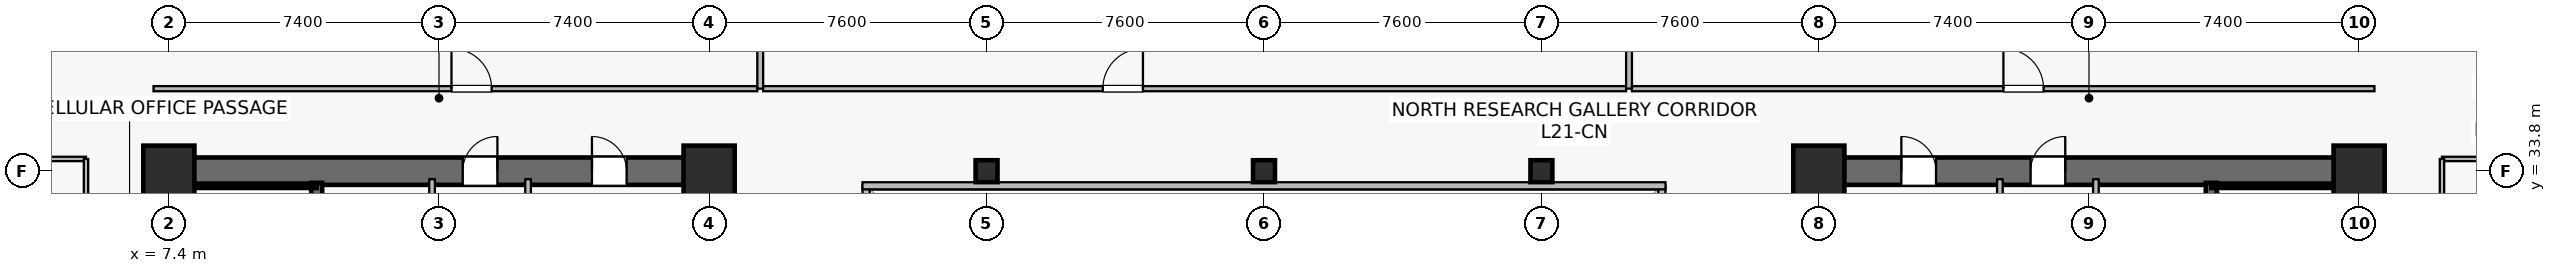
"""IFC4 building model, lengths in metres.
Left out: names, types, materials, properties, quantities, classifications, styles, units other than length and angle.
Written with IfcOpenShell. Run it as: python <this file> out.ifc"""

import sys

from ifc_helpers import new_model, si_unit, direction, frame, frame_2d, origin, origin_2d, place, context, subcontext, project, spatial, rectangle, hollow_rectangle, extrude, source, transform, mapped, element, fill, save


model = new_model("IFC4")
c1 = context("Model", 3, precision=1e-05, world=origin(), true_north=direction((0.0, 1.0)))
c2 = subcontext(c1, "Body", "Model", "MODEL_VIEW")
j1 = project(units=[si_unit("LENGTHUNIT", "METRE"), si_unit("PLANEANGLEUNIT", "RADIAN")], contexts=[c1])
p1 = place(None, origin())
s1 = spatial("IfcSite", under=j1, at=p1, CompositionType="ELEMENT")
p2 = place(p1, origin())
s2 = spatial("IfcBuilding", under=s1, at=p2, CompositionType="ELEMENT")
p3 = place(p2, frame((0.0, 0.0, 86.7)))
s3 = spatial("IfcBuildingStorey", under=s2, at=p3, CompositionType="ELEMENT", Elevation=86.7)
p4 = place(p3, frame((7.025, 33.8, 0.0), z_axis=(0.0, 0.0, 1.0), x_axis=(1.0, 0.0, 0.0)))
e1 = element("IfcWall", 1, at=p4, inside=s3, PredefinedType="SHEAR", context=c2, shape_type="SweptSolid", body=[
    extrude(rectangle(XDim=15.55, YDim=0.75, at=frame_2d((7.775, 0.0))), origin(), (0.0, 0.0, 1.0), 3.78),
])
p5 = place(p4, frame((8.425, 0.0, 0.0)))
e2 = element("IfcOpeningElement", 2, at=p5, cuts=e1, PredefinedType="OPENING", context=c2, shape_type="SweptSolid", body=[
    extrude(rectangle(XDim=0.95, YDim=2.15, at=frame_2d((0.475, 1.075))), frame((0.0, 0.385, 0.0), z_axis=(0.0, -1.0, 0.0), x_axis=(1.0, 0.0, 0.0)), (0.0, 0.0, 1.0), 0.77),
])
p6 = place(p4, frame((11.965, 0.0, 0.0)))
e3 = element("IfcOpeningElement", 3, at=p6, cuts=e1, PredefinedType="OPENING", context=c2, shape_type="SweptSolid", body=[
    extrude(rectangle(XDim=0.95, YDim=2.15, at=frame_2d((0.475, 1.075))), frame((0.0, 0.385, 0.0), z_axis=(0.0, -1.0, 0.0), x_axis=(1.0, 0.0, 0.0)), (0.0, 0.0, 1.0), 0.77),
])
p7 = place(p3, frame((7.4, 15.175, 0.0), z_axis=(0.0, 0.0, 1.0), x_axis=(0.0, 1.0, 0.0)))
e4 = element("IfcWall", 4, at=p7, inside=s3, PredefinedType="SHEAR", context=c2, shape_type="SweptSolid", body=[
    extrude(rectangle(XDim=18.25, YDim=0.75, at=frame_2d((9.125, 0.0))), origin(), (0.0, 0.0, 1.0), 3.78),
])
p8 = place(p3, frame((22.2, 15.175, 0.0), z_axis=(0.0, 0.0, 1.0), x_axis=(0.0, 1.0, 0.0)))
e5 = element("IfcWall", 5, at=p8, inside=s3, PredefinedType="SHEAR", context=c2, shape_type="SweptSolid", body=[
    extrude(rectangle(XDim=18.25, YDim=0.75, at=frame_2d((9.125, 0.0))), origin(), (0.0, 0.0, 1.0), 3.78),
])
p9 = place(p8, frame((3.375, 0.0, 0.0)))
e6 = element("IfcOpeningElement", 6, at=p9, cuts=e5, PredefinedType="OPENING", context=c2, shape_type="SweptSolid", body=[
    extrude(rectangle(XDim=1.42, YDim=2.2, at=frame_2d((0.71, 1.1))), frame((0.0, 0.385, 0.0), z_axis=(0.0, -1.0, 0.0), x_axis=(1.0, 0.0, 0.0)), (0.0, 0.0, 1.0), 0.77),
])
p10 = place(p3, frame((11.45, 24.85, 0.0), z_axis=(0.0, 0.0, 1.0), x_axis=(0.0, 1.0, 0.0)))
e7 = element("IfcWall", 7, at=p10, inside=s3, PredefinedType="SHEAR", context=c2, shape_type="SweptSolid", body=[
    extrude(rectangle(XDim=8.63, YDim=0.3, at=frame_2d((4.315, 0.0))), origin(), (0.0, 0.0, 1.0), 3.78),
])
p11 = place(p10, frame((0.42, 0.0, 0.0)))
e8 = element("IfcOpeningElement", 8, at=p11, cuts=e7, PredefinedType="OPENING", context=c2, shape_type="SweptSolid", body=[
    extrude(rectangle(XDim=1.1, YDim=2.15, at=frame_2d((0.55, 1.075))), frame((0.0, 0.16, 0.0), z_axis=(0.0, -1.0, 0.0), x_axis=(1.0, 0.0, 0.0)), (0.0, 0.0, 1.0), 0.32),
])
p12 = place(p3, frame((7.73, 33.4, 0.0), z_axis=(0.0, 0.0, 1.0), x_axis=(1.0, 0.0, 0.0)))
e9 = element("IfcWall", 9, at=p12, inside=s3, PredefinedType="SOLIDWALL", context=c2, shape_type="SweptSolid", body=[
    extrude(rectangle(XDim=3.72, YDim=0.12, at=frame_2d((1.86, 0.0))), origin(), (0.0, 0.0, 1.0), 3.78),
])
p13 = place(p3, frame((52.225, 33.8, 0.0), z_axis=(0.0, 0.0, 1.0), x_axis=(1.0, 0.0, 0.0)))
e10 = element("IfcWall", 10, at=p13, inside=s3, PredefinedType="SHEAR", context=c2, shape_type="SweptSolid", body=[
    extrude(rectangle(XDim=15.55, YDim=0.75, at=frame_2d((7.775, 0.0))), origin(), (0.0, 0.0, 1.0), 3.78),
])
p14 = place(p13, frame((6.175, 0.0, 0.0)))
e11 = element("IfcOpeningElement", 11, at=p14, cuts=e10, PredefinedType="OPENING", context=c2, shape_type="SweptSolid", body=[
    extrude(rectangle(XDim=0.95, YDim=2.15, at=frame_2d((0.475, 1.075))), frame((0.0, 0.385, 0.0), z_axis=(0.0, -1.0, 0.0), x_axis=(1.0, 0.0, 0.0)), (0.0, 0.0, 1.0), 0.77),
])
p15 = place(p13, frame((2.635, 0.0, 0.0)))
e12 = element("IfcOpeningElement", 12, at=p15, cuts=e10, PredefinedType="OPENING", context=c2, shape_type="SweptSolid", body=[
    extrude(rectangle(XDim=0.95, YDim=2.15, at=frame_2d((0.475, 1.075))), frame((0.0, 0.385, 0.0), z_axis=(0.0, -1.0, 0.0), x_axis=(1.0, 0.0, 0.0)), (0.0, 0.0, 1.0), 0.77),
])
p16 = place(p3, frame((52.6, 15.175, 0.0), z_axis=(0.0, 0.0, 1.0), x_axis=(0.0, 1.0, 0.0)))
e13 = element("IfcWall", 13, at=p16, inside=s3, PredefinedType="SHEAR", context=c2, shape_type="SweptSolid", body=[
    extrude(rectangle(XDim=18.25, YDim=0.75, at=frame_2d((9.125, 0.0))), origin(), (0.0, 0.0, 1.0), 3.78),
])
p17 = place(p16, frame((3.375, 0.0, 0.0)))
e14 = element("IfcOpeningElement", 14, at=p17, cuts=e13, PredefinedType="OPENING", context=c2, shape_type="SweptSolid", body=[
    extrude(rectangle(XDim=1.42, YDim=2.2, at=frame_2d((0.71, 1.1))), frame((0.0, 0.385, 0.0), z_axis=(0.0, -1.0, 0.0), x_axis=(1.0, 0.0, 0.0)), (0.0, 0.0, 1.0), 0.77),
])
p18 = place(p3, frame((67.4, 15.175, 0.0), z_axis=(0.0, 0.0, 1.0), x_axis=(0.0, 1.0, 0.0)))
e15 = element("IfcWall", 15, at=p18, inside=s3, PredefinedType="SHEAR", context=c2, shape_type="SweptSolid", body=[
    extrude(rectangle(XDim=18.25, YDim=0.75, at=frame_2d((9.125, 0.0))), origin(), (0.0, 0.0, 1.0), 3.78),
])
p19 = place(p3, frame((63.35, 24.85, 0.0), z_axis=(0.0, 0.0, 1.0), x_axis=(0.0, 1.0, 0.0)))
e16 = element("IfcWall", 16, at=p19, inside=s3, PredefinedType="SHEAR", context=c2, shape_type="SweptSolid", body=[
    extrude(rectangle(XDim=8.63, YDim=0.3, at=frame_2d((4.315, 0.0))), origin(), (0.0, 0.0, 1.0), 3.78),
])
p20 = place(p19, frame((0.42, 0.0, 0.0)))
e17 = element("IfcOpeningElement", 17, at=p20, cuts=e16, PredefinedType="OPENING", context=c2, shape_type="SweptSolid", body=[
    extrude(rectangle(XDim=1.1, YDim=2.15, at=frame_2d((0.55, 1.075))), frame((0.0, 0.16, 0.0), z_axis=(0.0, -1.0, 0.0), x_axis=(1.0, 0.0, 0.0)), (0.0, 0.0, 1.0), 0.32),
])
p21 = place(p3, frame((63.35, 33.4, 0.0), z_axis=(0.0, 0.0, 1.0), x_axis=(1.0, 0.0, 0.0)))
e18 = element("IfcWall", 18, at=p21, inside=s3, PredefinedType="SOLIDWALL", context=c2, shape_type="SweptSolid", body=[
    extrude(rectangle(XDim=3.72, YDim=0.12, at=frame_2d((1.86, 0.0))), origin(), (0.0, 0.0, 1.0), 3.78),
])
m1 = source(origin(), c2, "Body", "SweptSolid", [
    extrude(rectangle(XDim=1.4, YDim=1.4, at=origin_2d()), origin(), (0.0, 0.0, 1.0), 4.1),
])
for number, where, z_axis, x_axis in (
    (19, (7.4, 33.8, 0.0), (0.0, 0.0, 1.0), (1.0, 0.0, 0.0)),
    (20, (22.2, 33.8, 0.0), (0.0, 0.0, 1.0), (1.0, 0.0, 0.0)),
    (21, (52.6, 33.8, 0.0), (0.0, 0.0, 1.0), (1.0, 0.0, 0.0)),
    (22, (67.4, 33.8, 0.0), (0.0, 0.0, 1.0), (1.0, 0.0, 0.0)),
):
    element("IfcColumn", number, at=place(p3, frame(where, z_axis=z_axis, x_axis=x_axis)), inside=s3, PredefinedType="COLUMN", context=c2, shape_type="MappedRepresentation", body=[
        mapped(m1, transform((0.0, 0.0, 0.0), scale=1.0)),
    ])
m2 = source(origin(), c2, "Body", "SweptSolid", [
    extrude(hollow_rectangle(XDim=0.6, YDim=0.6, WallThickness=0.028, at=origin_2d()), origin(), (0.0, 0.0, 1.0), 4.1),
])
for number, where, z_axis, x_axis in (
    (23, (29.8, 33.8, 0.0), (0.0, 0.0, 1.0), (1.0, 0.0, 0.0)),
    (24, (37.4, 33.8, 0.0), (0.0, 0.0, 1.0), (1.0, 0.0, 0.0)),
    (25, (45.0, 33.8, 0.0), (0.0, 0.0, 1.0), (1.0, 0.0, 0.0)),
):
    element("IfcColumn", number, at=place(p3, frame(where, z_axis=z_axis, x_axis=x_axis)), inside=s3, PredefinedType="COLUMN", context=c2, shape_type="MappedRepresentation", body=[
        mapped(m2, transform((0.0, 0.0, 0.0), scale=1.0)),
    ])
p22 = place(p3, frame((14.61, 29.65, 0.0), z_axis=(0.0, 0.0, 1.0), x_axis=(0.0, 1.0, 0.0)))
e26 = element("IfcWall", 26, at=p22, inside=s3, PredefinedType="PLUMBINGWALL", context=c2, shape_type="SweptSolid", body=[
    extrude(rectangle(XDim=3.93, YDim=0.155, at=frame_2d((1.965, 0.0))), origin(), (0.0, 0.0, 1.0), 3.115),
])
p23 = place(p3, frame((17.24, 29.65, 0.0), z_axis=(0.0, 0.0, 1.0), x_axis=(0.0, 1.0, 0.0)))
e27 = element("IfcWall", 27, at=p23, inside=s3, PredefinedType="PLUMBINGWALL", context=c2, shape_type="SweptSolid", body=[
    extrude(rectangle(XDim=3.93, YDim=0.155, at=frame_2d((1.965, 0.0))), origin(), (0.0, 0.0, 1.0), 3.78),
])
p24 = place(p3, frame((60.19, 29.65, 0.0), z_axis=(0.0, 0.0, 1.0), x_axis=(0.0, 1.0, 0.0)))
e28 = element("IfcWall", 28, at=p24, inside=s3, PredefinedType="PLUMBINGWALL", context=c2, shape_type="SweptSolid", body=[
    extrude(rectangle(XDim=3.93, YDim=0.155, at=frame_2d((1.965, 0.0))), origin(), (0.0, 0.0, 1.0), 3.115),
])
p25 = place(p3, frame((57.56, 29.65, 0.0), z_axis=(0.0, 0.0, 1.0), x_axis=(0.0, 1.0, 0.0)))
e29 = element("IfcWall", 29, at=p25, inside=s3, PredefinedType="PLUMBINGWALL", context=c2, shape_type="SweptSolid", body=[
    extrude(rectangle(XDim=3.93, YDim=0.155, at=frame_2d((1.965, 0.0))), origin(), (0.0, 0.0, 1.0), 3.78),
])
p26 = place(p3, frame((26.5, 15.2, 0.0), z_axis=(0.0, 0.0, 1.0), x_axis=(0.0, 1.0, 0.0)))
e30 = element("IfcWall", 30, at=p26, inside=s3, PredefinedType="SOLIDWALL", context=c2, shape_type="SweptSolid", body=[
    extrude(rectangle(XDim=18.2, YDim=0.195, at=frame_2d((9.1, 0.0))), origin(), (0.0, 0.0, 1.0), 3.78),
])
p27 = place(p26, frame((1.8, 0.0, 0.9)))
e31 = element("IfcOpeningElement", 31, at=p27, cuts=e30, PredefinedType="OPENING", context=c2, shape_type="SweptSolid", body=[
    extrude(rectangle(XDim=1.2, YDim=1.35, at=frame_2d((0.6, 0.675))), frame((0.0, 0.107, 0.0), z_axis=(0.0, -1.0, 0.0), x_axis=(1.0, 0.0, 0.0)), (0.0, 0.0, 1.0), 0.215),
])
p28 = place(p26, frame((13.2, 0.0, 0.9)))
e32 = element("IfcOpeningElement", 32, at=p28, cuts=e30, PredefinedType="OPENING", context=c2, shape_type="SweptSolid", body=[
    extrude(rectangle(XDim=1.2, YDim=1.35, at=frame_2d((0.6, 0.675))), frame((0.0, 0.107, 0.0), z_axis=(0.0, -1.0, 0.0), x_axis=(1.0, 0.0, 0.0)), (0.0, 0.0, 1.0), 0.215),
])
p29 = place(p3, frame((48.3, 15.2, 0.0), z_axis=(0.0, 0.0, 1.0), x_axis=(0.0, 1.0, 0.0)))
e33 = element("IfcWall", 33, at=p29, inside=s3, PredefinedType="SOLIDWALL", context=c2, shape_type="SweptSolid", body=[
    extrude(rectangle(XDim=18.2, YDim=0.195, at=frame_2d((9.1, 0.0))), origin(), (0.0, 0.0, 1.0), 3.78),
])
p30 = place(p29, frame((1.8, 0.0, 0.9)))
e34 = element("IfcOpeningElement", 34, at=p30, cuts=e33, PredefinedType="OPENING", context=c2, shape_type="SweptSolid", body=[
    extrude(rectangle(XDim=1.2, YDim=1.35, at=frame_2d((0.6, 0.675))), frame((0.0, 0.107, 0.0), z_axis=(0.0, -1.0, 0.0), x_axis=(1.0, 0.0, 0.0)), (0.0, 0.0, 1.0), 0.215),
])
p31 = place(p29, frame((13.2, 0.0, 0.9)))
e35 = element("IfcOpeningElement", 35, at=p31, cuts=e33, PredefinedType="OPENING", context=c2, shape_type="SweptSolid", body=[
    extrude(rectangle(XDim=1.2, YDim=1.35, at=frame_2d((0.6, 0.675))), frame((0.0, 0.107, 0.0), z_axis=(0.0, -1.0, 0.0), x_axis=(1.0, 0.0, 0.0)), (0.0, 0.0, 1.0), 0.215),
])
p32 = place(p3, frame((26.4, 33.4, 0.0), z_axis=(0.0, 0.0, 1.0), x_axis=(1.0, 0.0, 0.0)))
e36 = element("IfcWall", 36, at=p32, inside=s3, PredefinedType="SOLIDWALL", context=c2, shape_type="SweptSolid", body=[
    extrude(rectangle(XDim=22.0, YDim=0.195, at=frame_2d((11.0, 0.0))), origin(), (0.0, 0.0, 1.0), 3.78),
])
p33 = place(p3, frame((6.98, 36.06, 0.0), z_axis=(0.0, 0.0, 1.0), x_axis=(1.0, 0.0, 0.0)))
e37 = element("IfcWall", 37, at=p33, inside=s3, PredefinedType="PARTITIONING", context=c2, shape_type="SweptSolid", body=[
    extrude(rectangle(XDim=16.54, YDim=0.14, at=frame_2d((8.27, 0.0))), origin(), (0.0, 0.0, 1.0), 3.115),
])
p34 = place(p33, frame((8.162, 0.0, 0.0)))
e38 = element("IfcOpeningElement", 38, at=p34, cuts=e37, PredefinedType="OPENING", context=c2, shape_type="SweptSolid", body=[
    extrude(rectangle(XDim=1.1, YDim=2.18, at=frame_2d((0.55, 1.09))), frame((0.0, 0.08, 0.0), z_axis=(0.0, -1.0, 0.0), x_axis=(1.0, 0.0, 0.0)), (0.0, 0.0, 1.0), 0.16),
])
p35 = place(p3, frame((23.6, 36.06, 0.0), z_axis=(0.0, 0.0, 1.0), x_axis=(0.0, 1.0, 0.0)))
e39 = element("IfcWall", 39, at=p35, inside=s3, PredefinedType="PARTITIONING", context=c2, shape_type="SweptSolid", body=[
    extrude(rectangle(XDim=12.43, YDim=0.16, at=frame_2d((6.215, 0.0))), origin(), (0.0, 0.0, 1.0), 3.015),
])
p36 = place(p3, frame((23.68, 36.06, 0.0), z_axis=(0.0, 0.0, 1.0), x_axis=(1.0, 0.0, 0.0)))
e40 = element("IfcWall", 40, at=p36, inside=s3, PredefinedType="PARTITIONING", context=c2, shape_type="SweptSolid", body=[
    extrude(rectangle(XDim=23.64, YDim=0.14, at=frame_2d((11.82, 0.0))), origin(), (0.0, 0.0, 1.0), 3.115),
])
p37 = place(p36, frame((9.304, 0.0, 0.0)))
e41 = element("IfcOpeningElement", 41, at=p37, cuts=e40, PredefinedType="OPENING", context=c2, shape_type="SweptSolid", body=[
    extrude(rectangle(XDim=1.1, YDim=2.18, at=frame_2d((0.55, 1.09))), frame((0.0, 0.08, 0.0), z_axis=(0.0, -1.0, 0.0), x_axis=(1.0, 0.0, 0.0)), (0.0, 0.0, 1.0), 0.16),
])
p38 = place(p3, frame((47.4, 36.06, 0.0), z_axis=(0.0, 0.0, 1.0), x_axis=(0.0, 1.0, 0.0)))
e42 = element("IfcWall", 42, at=p38, inside=s3, PredefinedType="PARTITIONING", context=c2, shape_type="SweptSolid", body=[
    extrude(rectangle(XDim=11.23, YDim=0.16, at=frame_2d((5.615, 0.0))), origin(), (0.0, 0.0, 1.0), 3.015),
])
p39 = place(p3, frame((47.48, 36.06, 0.0), z_axis=(0.0, 0.0, 1.0), x_axis=(1.0, 0.0, 0.0)))
e43 = element("IfcWall", 43, at=p39, inside=s3, PredefinedType="PARTITIONING", context=c2, shape_type="SweptSolid", body=[
    extrude(rectangle(XDim=20.34, YDim=0.14, at=frame_2d((10.17, 0.0))), origin(), (0.0, 0.0, 1.0), 3.115),
])
p40 = place(p39, frame((10.176, 0.0, 0.0)))
e44 = element("IfcOpeningElement", 44, at=p40, cuts=e43, PredefinedType="OPENING", context=c2, shape_type="SweptSolid", body=[
    extrude(rectangle(XDim=1.1, YDim=2.18, at=frame_2d((0.55, 1.09))), frame((0.0, 0.08, 0.0), z_axis=(0.0, -1.0, 0.0), x_axis=(1.0, 0.0, 0.0)), (0.0, 0.0, 1.0), 0.16),
])
p41 = place(p3, frame((0.11, 34.135, 0.0), z_axis=(0.0, 0.0, 1.0), x_axis=(1.0, 0.0, 0.0)))
e45 = element("IfcWall", 45, at=p41, inside=s3, PredefinedType="PARTITIONING", context=c2, shape_type="SweptSolid", body=[
    extrude(rectangle(XDim=5.02, YDim=0.12, at=frame_2d((2.51, 0.0))), origin(), (0.0, 0.0, 1.0), 3.78),
])
p42 = place(p3, frame((5.13, 23.86, 0.0), z_axis=(0.0, 0.0, 1.0), x_axis=(0.0, 1.0, 0.0)))
e46 = element("IfcWall", 46, at=p42, inside=s3, PredefinedType="PARTITIONING", context=c2, shape_type="SweptSolid", body=[
    extrude(rectangle(XDim=10.275, YDim=0.12, at=frame_2d((5.137, 0.0))), origin(), (0.0, 0.0, 1.0), 3.78),
])
p43 = place(p42, frame((4.688, 0.0, 0.0)))
e47 = element("IfcOpeningElement", 47, at=p43, cuts=e46, PredefinedType="OPENING", context=c2, shape_type="SweptSolid", body=[
    extrude(rectangle(XDim=0.9, YDim=2.1, at=frame_2d((0.45, 1.05))), frame((0.0, 0.07, 0.0), z_axis=(0.0, -1.0, 0.0), x_axis=(1.0, 0.0, 0.0)), (0.0, 0.0, 1.0), 0.14),
])
p44 = place(p3, frame((69.67, 34.135, 0.0), z_axis=(0.0, 0.0, 1.0), x_axis=(1.0, 0.0, 0.0)))
e48 = element("IfcWall", 48, at=p44, inside=s3, PredefinedType="PARTITIONING", context=c2, shape_type="SweptSolid", body=[
    extrude(rectangle(XDim=5.02, YDim=0.12, at=frame_2d((2.51, 0.0))), origin(), (0.0, 0.0, 1.0), 3.78),
])
p45 = place(p3, frame((69.67, 27.86, 0.0), z_axis=(0.0, 0.0, 1.0), x_axis=(0.0, 1.0, 0.0)))
e49 = element("IfcWall", 49, at=p45, inside=s3, PredefinedType="PARTITIONING", context=c2, shape_type="SweptSolid", body=[
    extrude(rectangle(XDim=6.275, YDim=0.12, at=frame_2d((3.137, 0.0))), origin(), (0.0, 0.0, 1.0), 3.78),
])
p46 = place(p45, frame((2.688, 0.0, 0.0)))
e50 = element("IfcOpeningElement", 50, at=p46, cuts=e49, PredefinedType="OPENING", context=c2, shape_type="SweptSolid", body=[
    extrude(rectangle(XDim=0.9, YDim=2.1, at=frame_2d((0.45, 1.05))), frame((0.0, 0.07, 0.0), z_axis=(0.0, -1.0, 0.0), x_axis=(1.0, 0.0, 0.0)), (0.0, 0.0, 1.0), 0.14),
])
m3 = source(origin(), c2, "Body", "SweptSolid", [
    extrude(rectangle(XDim=0.95, YDim=2.15, at=frame_2d((0.475, 1.075))), frame((0.0, 0.025, 0.0), z_axis=(0.0, -1.0, 0.0), x_axis=(1.0, 0.0, 0.0)), (0.0, 0.0, 1.0), 0.05),
])
p47 = place(p5, origin())
e51 = element("IfcDoor", 51, at=p47, inside=s3, OperationType="SINGLE_SWING_RIGHT", PredefinedType="DOOR", context=c2, shape_type="MappedRepresentation", body=[
    mapped(m3, transform((0.0, 0.0, 0.0), scale=1.0)),
])
fill(e2, e51)
p48 = place(p6, origin())
e52 = element("IfcDoor", 52, at=p48, inside=s3, OperationType="SINGLE_SWING_LEFT", PredefinedType="DOOR", context=c2, shape_type="MappedRepresentation", body=[
    mapped(m3, transform((0.0, 0.0, 0.0), scale=1.0)),
])
fill(e3, e52)
p49 = place(p14, origin())
e53 = element("IfcDoor", 53, at=p49, inside=s3, OperationType="SINGLE_SWING_RIGHT", PredefinedType="DOOR", context=c2, shape_type="MappedRepresentation", body=[
    mapped(m3, transform((0.0, 0.0, 0.0), scale=1.0)),
])
fill(e11, e53)
p50 = place(p15, origin())
e54 = element("IfcDoor", 54, at=p50, inside=s3, OperationType="SINGLE_SWING_LEFT", PredefinedType="DOOR", context=c2, shape_type="MappedRepresentation", body=[
    mapped(m3, transform((0.0, 0.0, 0.0), scale=1.0)),
])
fill(e12, e54)
m4 = source(origin(), c2, "Body", "SweptSolid", [
    extrude(rectangle(XDim=1.1, YDim=2.18, at=frame_2d((0.55, 1.09))), frame((0.0, 0.025, 0.0), z_axis=(0.0, -1.0, 0.0), x_axis=(1.0, 0.0, 0.0)), (0.0, 0.0, 1.0), 0.05),
])
p51 = place(p34, origin())
e55 = element("IfcDoor", 55, at=p51, inside=s3, OperationType="SINGLE_SWING_LEFT", PredefinedType="DOOR", context=c2, shape_type="MappedRepresentation", body=[
    mapped(m4, transform((0.0, 0.0, 0.0), scale=1.0)),
])
fill(e38, e55)
p52 = place(p37, origin())
e56 = element("IfcDoor", 56, at=p52, inside=s3, OperationType="SINGLE_SWING_RIGHT", PredefinedType="DOOR", context=c2, shape_type="MappedRepresentation", body=[
    mapped(m4, transform((0.0, 0.0, 0.0), scale=1.0)),
])
fill(e41, e56)
p53 = place(p40, origin())
e57 = element("IfcDoor", 57, at=p53, inside=s3, OperationType="SINGLE_SWING_LEFT", PredefinedType="DOOR", context=c2, shape_type="MappedRepresentation", body=[
    mapped(m4, transform((0.0, 0.0, 0.0), scale=1.0)),
])
fill(e44, e57)
save(model, sys.argv[1])
